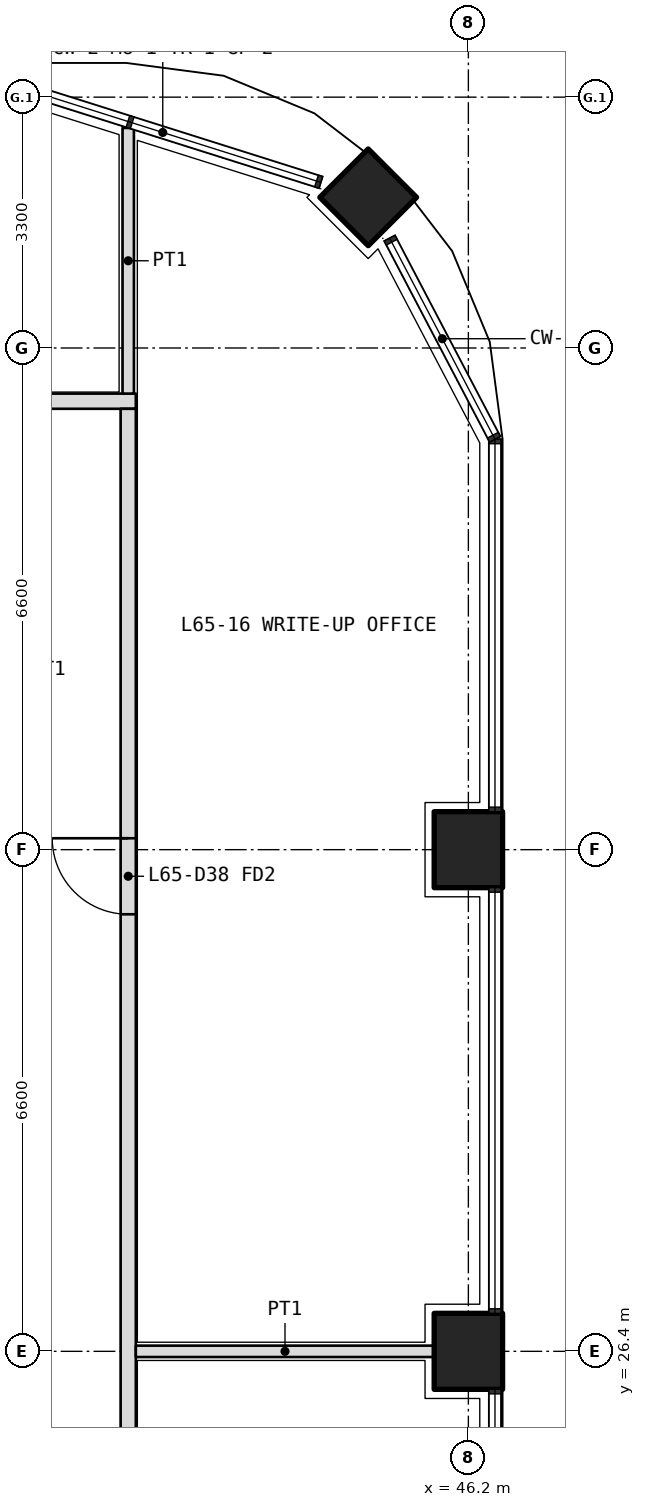
"""IFC4 building model, lengths in metres.
Left out: names, types, materials, properties, quantities, classifications, styles, units other than length and angle.
Written with IfcOpenShell. Run it as: python <this file> out.ifc"""

import sys

from ifc_helpers import new_model, si_unit, direction, frame, frame_2d, origin, origin_2d, place, context, subcontext, project, spatial, rectangle, extrude, element, fill, save


model = new_model("IFC4")
c1 = context("Model", 3, precision=1e-05, world=origin(), true_north=direction((0.0, 1.0)))
c2 = subcontext(c1, "Body", "Model", "MODEL_VIEW")
j1 = project(units=[si_unit("LENGTHUNIT", "METRE"), si_unit("PLANEANGLEUNIT", "RADIAN")], contexts=[c1])
p1 = place(None, origin())
s1 = spatial("IfcSite", under=j1, at=p1, CompositionType="ELEMENT")
p2 = place(p1, origin())
s2 = spatial("IfcBuilding", under=s1, at=p2, CompositionType="ELEMENT")
p3 = place(p2, frame((0.0, 0.0, 283.8)))
s3 = spatial("IfcBuildingStorey", under=s2, at=p3, CompositionType="ELEMENT", Elevation=283.8)
p4 = place(p3, frame((44.882, 41.582, 0.0), z_axis=(0.0, 0.0, 1.0), x_axis=(0.707106781187, 0.707106781187, 0.0)))
e1 = element("IfcColumn", 1, at=p4, inside=s3, PredefinedType="COLUMN", context=c2, shape_type="SweptSolid", body=[
    extrude(rectangle(XDim=0.9, YDim=0.9, at=origin_2d()), origin(), (0.0, 0.0, 1.0), 4.2),
])
for number, where, z_axis, x_axis in (
    (2, (46.2, 26.4, 0.0), (0.0, 0.0, 1.0), (0.0, 1.0, 0.0)),
    (3, (46.2, 33.0, 0.0), (0.0, 0.0, 1.0), (0.0, 1.0, 0.0)),
):
    element("IfcColumn", number, at=place(p3, frame(where, z_axis=z_axis, x_axis=x_axis)), inside=s3, PredefinedType="COLUMN", context=c2, shape_type="SweptSolid", body=[
        extrude(rectangle(XDim=1.0, YDim=0.9, at=origin_2d()), origin(), (0.0, 0.0, 1.0), 4.2),
    ])
p5 = place(p3, frame((10.975, 38.9, 0.0), z_axis=(0.0, 0.0, 1.0), x_axis=(1.0, 0.0, 0.0)))
e4 = element("IfcWall", 4, at=p5, inside=s3, PredefinedType="PARTITIONING", context=c2, shape_type="SweptSolid", body=[
    extrude(rectangle(XDim=30.85, YDim=0.2, at=frame_2d((15.425, 0.0))), origin(), (0.0, 0.0, 1.0), 3.0),
])
p6 = place(p5, frame((8.913, 0.0, 0.0)))
e5 = element("IfcOpeningElement", 5, at=p6, cuts=e4, PredefinedType="OPENING", context=c2, shape_type="SweptSolid", body=[
    extrude(rectangle(XDim=1.0, YDim=2.1, at=frame_2d((0.5, 1.05))), frame((0.0, 0.11, 0.0), z_axis=(0.0, -1.0, 0.0), x_axis=(1.0, 0.0, 0.0)), (0.0, 0.0, 1.0), 0.22),
])
p7 = place(p5, frame((20.325, 0.0, 0.0)))
e6 = element("IfcOpeningElement", 6, at=p7, cuts=e4, PredefinedType="OPENING", context=c2, shape_type="SweptSolid", body=[
    extrude(rectangle(XDim=1.0, YDim=2.1, at=frame_2d((0.5, 1.05))), frame((0.0, 0.11, 0.0), z_axis=(0.0, -1.0, 0.0), x_axis=(1.0, 0.0, 0.0)), (0.0, 0.0, 1.0), 0.22),
])
p8 = place(p5, frame((23.625, 0.0, 0.0)))
e7 = element("IfcOpeningElement", 7, at=p8, cuts=e4, PredefinedType="OPENING", context=c2, shape_type="SweptSolid", body=[
    extrude(rectangle(XDim=1.0, YDim=2.1, at=frame_2d((0.5, 1.05))), frame((0.0, 0.11, 0.0), z_axis=(0.0, -1.0, 0.0), x_axis=(1.0, 0.0, 0.0)), (0.0, 0.0, 1.0), 0.22),
])
p9 = place(p5, frame((27.438, 0.0, 0.0)))
e8 = element("IfcOpeningElement", 8, at=p9, cuts=e4, PredefinedType="OPENING", context=c2, shape_type="SweptSolid", body=[
    extrude(rectangle(XDim=1.2, YDim=2.1, at=frame_2d((0.6, 1.05))), frame((0.0, 0.11, 0.0), z_axis=(0.0, -1.0, 0.0), x_axis=(1.0, 0.0, 0.0)), (0.0, 0.0, 1.0), 0.22),
])
p10 = place(p3, frame((41.725, 7.4, 0.0), z_axis=(0.0, 0.0, 1.0), x_axis=(0.0, 1.0, 0.0)))
e9 = element("IfcWall", 9, at=p10, inside=s3, PredefinedType="PARTITIONING", context=c2, shape_type="SweptSolid", body=[
    extrude(rectangle(XDim=31.4, YDim=0.2, at=frame_2d((15.7, 0.0))), origin(), (0.0, 0.0, 1.0), 3.0),
])
p11 = place(p10, frame((5.65, 0.0, 0.0)))
e10 = element("IfcOpeningElement", 10, at=p11, cuts=e9, PredefinedType="OPENING", context=c2, shape_type="SweptSolid", body=[
    extrude(rectangle(XDim=1.0, YDim=2.1, at=frame_2d((0.5, 1.05))), frame((0.0, 0.11, 0.0), z_axis=(0.0, -1.0, 0.0), x_axis=(1.0, 0.0, 0.0)), (0.0, 0.0, 1.0), 0.22),
])
p12 = place(p10, frame((13.4, 0.0, 0.0)))
e11 = element("IfcOpeningElement", 11, at=p12, cuts=e9, PredefinedType="OPENING", context=c2, shape_type="SweptSolid", body=[
    extrude(rectangle(XDim=1.0, YDim=2.1, at=frame_2d((0.5, 1.05))), frame((0.0, 0.11, 0.0), z_axis=(0.0, -1.0, 0.0), x_axis=(1.0, 0.0, 0.0)), (0.0, 0.0, 1.0), 0.22),
])
p13 = place(p10, frame((16.75, 0.0, 0.0)))
e12 = element("IfcOpeningElement", 12, at=p13, cuts=e9, PredefinedType="OPENING", context=c2, shape_type="SweptSolid", body=[
    extrude(rectangle(XDim=0.9, YDim=2.1, at=frame_2d((0.45, 1.05))), frame((0.0, 0.11, 0.0), z_axis=(0.0, -1.0, 0.0), x_axis=(1.0, 0.0, 0.0)), (0.0, 0.0, 1.0), 0.22),
])
p14 = place(p10, frame((24.75, 0.0, 0.0)))
e13 = element("IfcOpeningElement", 13, at=p14, cuts=e9, PredefinedType="OPENING", context=c2, shape_type="SweptSolid", body=[
    extrude(rectangle(XDim=1.0, YDim=2.1, at=frame_2d((0.5, 1.05))), frame((0.0, 0.11, 0.0), z_axis=(0.0, -1.0, 0.0), x_axis=(1.0, 0.0, 0.0)), (0.0, 0.0, 1.0), 0.22),
])
p15 = place(p3, frame((41.725, 42.495, 0.0), z_axis=(0.0, 0.0, 1.0), x_axis=(0.0, -1.0, 0.0)))
e14 = element("IfcWall", 14, at=p15, inside=s3, PredefinedType="PARTITIONING", context=c2, shape_type="SweptSolid", body=[
    extrude(rectangle(XDim=3.495, YDim=0.15, at=frame_2d((1.748, 0.0))), origin(), (0.0, 0.0, 1.0), 2.7),
])
p16 = place(p3, frame((45.75, 26.4, 0.0), z_axis=(0.0, 0.0, 1.0), x_axis=(-1.0, 0.0, 0.0)))
e15 = element("IfcWall", 15, at=p16, inside=s3, PredefinedType="PARTITIONING", context=c2, shape_type="SweptSolid", body=[
    extrude(rectangle(XDim=3.925, YDim=0.15, at=frame_2d((1.962, 0.0))), origin(), (0.0, 0.0, 1.0), 3.0),
])
p17 = place(p14, origin())
e16 = element("IfcDoor", 16, at=p17, inside=s3, OperationType="SINGLE_SWING_RIGHT", PredefinedType="DOOR", context=c2, shape_type="SweptSolid", body=[
    extrude(rectangle(XDim=1.0, YDim=2.1, at=frame_2d((0.5, 1.05))), frame((0.0, 0.025, 0.0), z_axis=(0.0, -1.0, 0.0), x_axis=(1.0, 0.0, 0.0)), (0.0, 0.0, 1.0), 0.05),
])
fill(e13, e16)
save(model, sys.argv[1])
